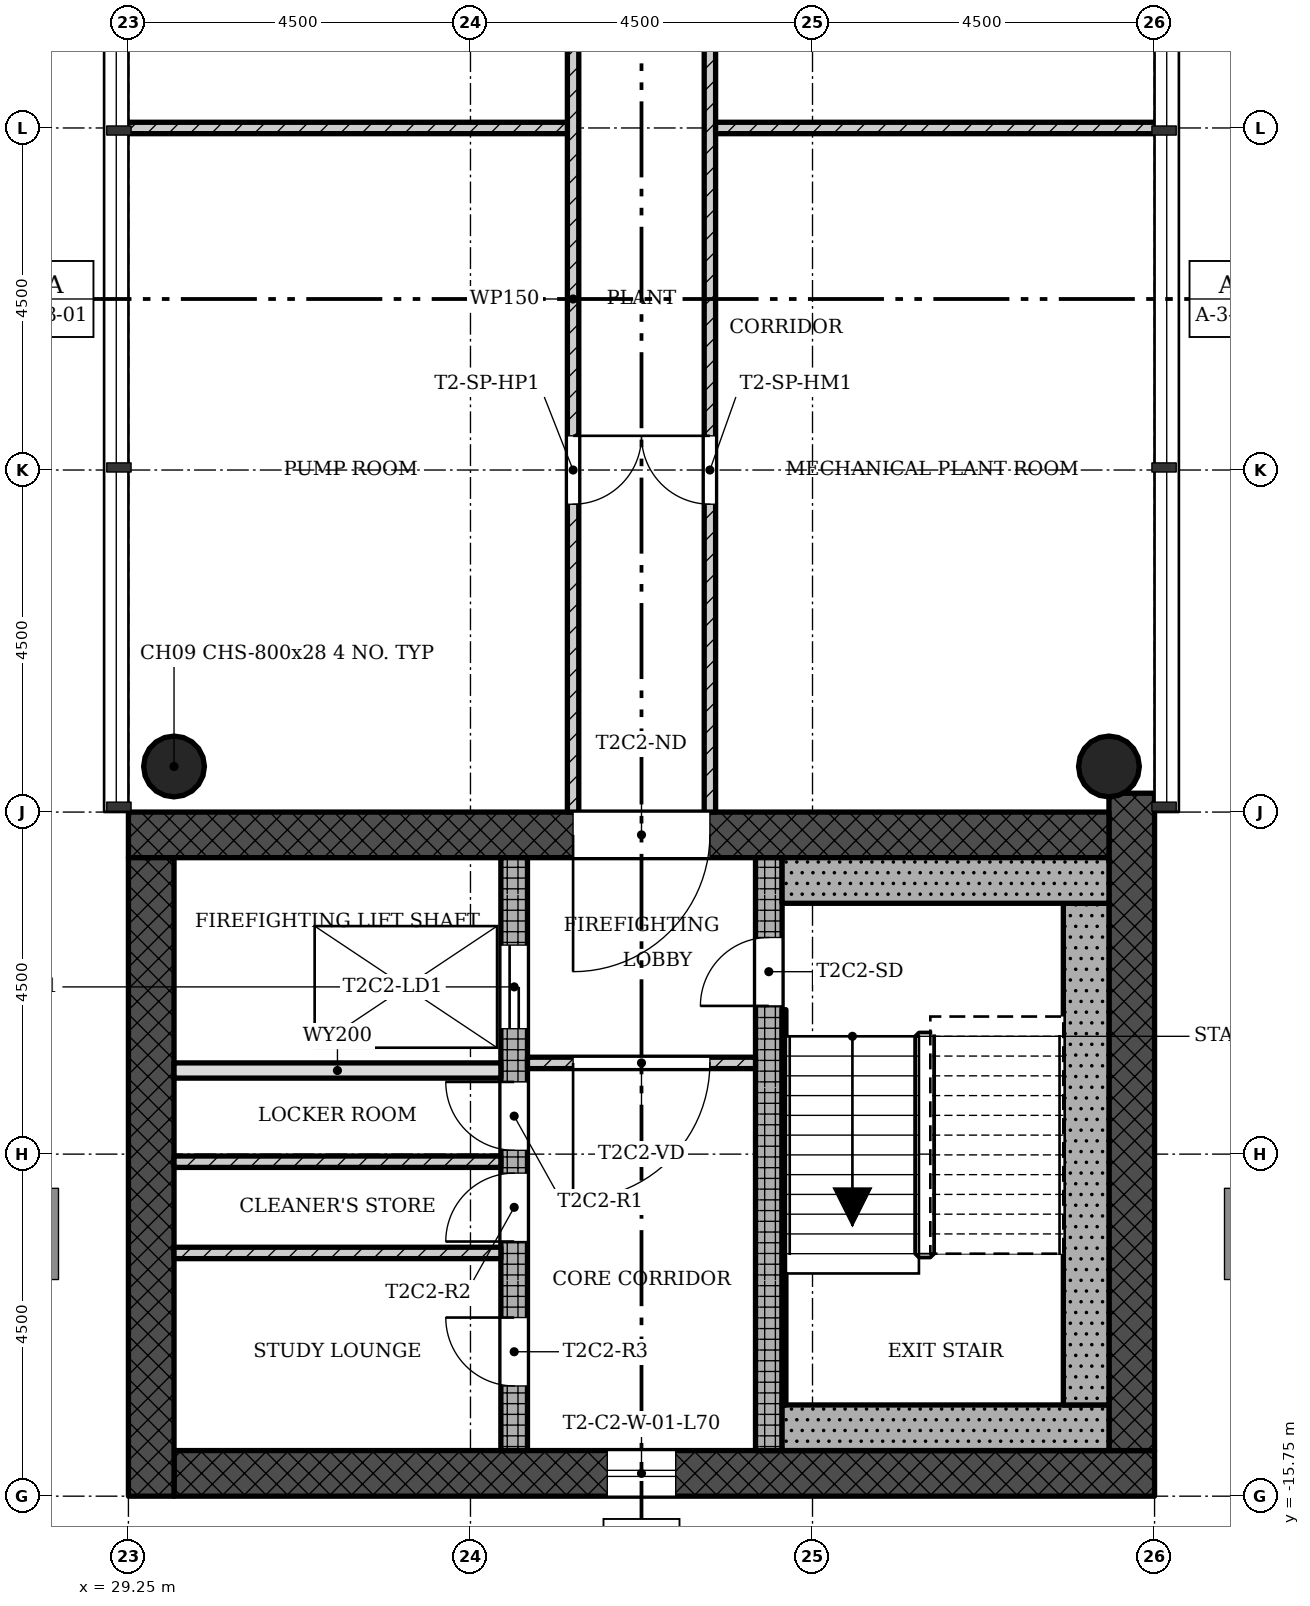
"""IFC4 building model, lengths in metres.
Left out: names, types, materials, properties, quantities, classifications, styles, units other than length and angle.
Written with IfcOpenShell. Run it as: python <this file> out.ifc"""

import sys

from ifc_helpers import new_model, si_unit, direction, frame, frame_2d, origin, origin_2d, place, context, subcontext, project, spatial, rectangle, hollow_circle, extrude, element, fill, save


model = new_model("IFC4")
c1 = context("Model", 3, precision=1e-05, world=origin(), true_north=direction((0.0, 1.0)))
c2 = subcontext(c1, "Body", "Model", "MODEL_VIEW")
j1 = project(units=[si_unit("LENGTHUNIT", "METRE"), si_unit("PLANEANGLEUNIT", "RADIAN")], contexts=[c1])
p1 = place(None, origin())
s1 = spatial("IfcSite", under=j1, at=p1, CompositionType="ELEMENT")
p2 = place(p1, origin())
s2 = spatial("IfcBuilding", under=s1, at=p2, CompositionType="ELEMENT")
p3 = place(p2, frame((0.0, 0.0, 255.9)))
s3 = spatial("IfcBuildingStorey", under=s2, at=p3, CompositionType="ELEMENT", Elevation=255.9)
p4 = place(p3, frame((29.85, -15.45, 0.0), z_axis=(0.0, 0.0, 1.0), x_axis=(1.0, 0.0, 0.0)))
e1 = element("IfcWall", 1, at=p4, inside=s3, PredefinedType="SHEAR", context=c2, shape_type="SweptSolid", body=[
    extrude(rectangle(XDim=12.9, YDim=0.6, at=frame_2d((6.45, 0.0))), origin(), (0.0, 0.0, 1.0), 4.5),
])
p5 = place(p4, frame((5.7, 0.0, 0.45)))
e2 = element("IfcOpeningElement", 2, at=p5, cuts=e1, PredefinedType="OPENING", context=c2, shape_type="SweptSolid", body=[
    extrude(rectangle(XDim=0.9, YDim=2.4, at=frame_2d((0.45, 1.2))), frame((0.0, 0.31, 0.0), z_axis=(0.0, -1.0, 0.0), x_axis=(1.0, 0.0, 0.0)), (0.0, 0.0, 1.0), 0.62),
])
p6 = place(p3, frame((42.45, -15.15, 0.0), z_axis=(0.0, 0.0, 1.0), x_axis=(0.0, 1.0, 0.0)))
e3 = element("IfcWall", 3, at=p6, inside=s3, PredefinedType="SHEAR", context=c2, shape_type="SweptSolid", body=[
    extrude(rectangle(XDim=8.648, YDim=0.6, at=frame_2d((4.324, 0.0))), origin(), (0.0, 0.0, 1.0), 4.5),
])
p7 = place(p3, frame((42.15, -7.05, 0.0), z_axis=(0.0, 0.0, 1.0), x_axis=(-1.0, 0.0, 0.0)))
e4 = element("IfcWall", 4, at=p7, inside=s3, PredefinedType="SHEAR", context=c2, shape_type="SweptSolid", body=[
    extrude(rectangle(XDim=12.9, YDim=0.6, at=frame_2d((6.45, 0.0))), origin(), (0.0, 0.0, 1.0), 4.5),
])
p8 = place(p7, frame((5.25, 0.0, 0.0)))
e5 = element("IfcOpeningElement", 5, at=p8, cuts=e4, PredefinedType="OPENING", context=c2, shape_type="SweptSolid", body=[
    extrude(rectangle(XDim=1.8, YDim=2.1, at=frame_2d((0.9, 1.05))), frame((0.0, 0.31, 0.0), z_axis=(0.0, -1.0, 0.0), x_axis=(1.0, 0.0, 0.0)), (0.0, 0.0, 1.0), 0.62),
])
p9 = place(p3, frame((29.55, -7.35, 0.0), z_axis=(0.0, 0.0, 1.0), x_axis=(0.0, -1.0, 0.0)))
e6 = element("IfcWall", 6, at=p9, inside=s3, PredefinedType="SHEAR", context=c2, shape_type="SweptSolid", body=[
    extrude(rectangle(XDim=8.4, YDim=0.6, at=frame_2d((4.2, 0.0))), origin(), (0.0, 0.0, 1.0), 4.5),
])
p10 = place(p3, frame((34.325, -15.15, 0.0), z_axis=(0.0, 0.0, 1.0), x_axis=(0.0, 1.0, 0.0)))
e7 = element("IfcWall", 7, at=p10, inside=s3, PredefinedType="SHEAR", context=c2, shape_type="SweptSolid", body=[
    extrude(rectangle(XDim=7.8, YDim=0.35, at=frame_2d((3.9, 0.0))), origin(), (0.0, 0.0, 1.0), 4.5),
])
p11 = place(p10, frame((5.55, 0.0, 0.0)))
e8 = element("IfcOpeningElement", 8, at=p11, cuts=e7, PredefinedType="OPENING", context=c2, shape_type="SweptSolid", body=[
    extrude(rectangle(XDim=1.1, YDim=2.1, at=frame_2d((0.55, 1.05))), frame((0.0, 0.185, 0.0), z_axis=(0.0, -1.0, 0.0), x_axis=(1.0, 0.0, 0.0)), (0.0, 0.0, 1.0), 0.37),
])
p12 = place(p10, frame((3.95, 0.0, 0.0)))
e9 = element("IfcOpeningElement", 9, at=p12, cuts=e7, PredefinedType="OPENING", context=c2, shape_type="SweptSolid", body=[
    extrude(rectangle(XDim=0.9, YDim=2.1, at=frame_2d((0.45, 1.05))), frame((0.0, 0.185, 0.0), z_axis=(0.0, -1.0, 0.0), x_axis=(1.0, 0.0, 0.0)), (0.0, 0.0, 1.0), 0.37),
])
p13 = place(p10, frame((2.75, 0.0, 0.0)))
e10 = element("IfcOpeningElement", 10, at=p13, cuts=e7, PredefinedType="OPENING", context=c2, shape_type="SweptSolid", body=[
    extrude(rectangle(XDim=0.9, YDim=2.1, at=frame_2d((0.45, 1.05))), frame((0.0, 0.185, 0.0), z_axis=(0.0, -1.0, 0.0), x_axis=(1.0, 0.0, 0.0)), (0.0, 0.0, 1.0), 0.37),
])
p14 = place(p10, frame((0.85, 0.0, 0.0)))
e11 = element("IfcOpeningElement", 11, at=p14, cuts=e7, PredefinedType="OPENING", context=c2, shape_type="SweptSolid", body=[
    extrude(rectangle(XDim=0.9, YDim=2.1, at=frame_2d((0.45, 1.05))), frame((0.0, 0.185, 0.0), z_axis=(0.0, -1.0, 0.0), x_axis=(1.0, 0.0, 0.0)), (0.0, 0.0, 1.0), 0.37),
])
p15 = place(p3, frame((37.675, -15.15, 0.0), z_axis=(0.0, 0.0, 1.0), x_axis=(0.0, 1.0, 0.0)))
e12 = element("IfcWall", 12, at=p15, inside=s3, PredefinedType="SHEAR", context=c2, shape_type="SweptSolid", body=[
    extrude(rectangle(XDim=7.8, YDim=0.35, at=frame_2d((3.9, 0.0))), origin(), (0.0, 0.0, 1.0), 4.5),
])
p16 = place(p15, frame((5.85, 0.0, 0.0)))
e13 = element("IfcOpeningElement", 13, at=p16, cuts=e12, PredefinedType="OPENING", context=c2, shape_type="SweptSolid", body=[
    extrude(rectangle(XDim=0.9, YDim=2.1, at=frame_2d((0.45, 1.05))), frame((0.0, 0.185, 0.0), z_axis=(0.0, -1.0, 0.0), x_axis=(1.0, 0.0, 0.0)), (0.0, 0.0, 1.0), 0.37),
])
for number, where, z_axis, x_axis in (
    (14, (42.15, -6.15, 0.0), (0.0, 0.0, 1.0), (1.0, 0.0, 0.0)),
    (15, (29.85, -6.15, 0.0), (0.0, 0.0, 1.0), (1.0, 0.0, 0.0)),
):
    element("IfcColumn", number, at=place(p3, frame(where, z_axis=z_axis, x_axis=x_axis)), inside=s3, PredefinedType="COLUMN", context=c2, shape_type="SweptSolid", body=[
        extrude(hollow_circle(Radius=0.4, WallThickness=0.028, at=origin_2d()), origin(), (0.0, 0.0, 1.0), 4.5),
    ])
p17 = place(p3, frame((34.5, -10.05, 0.0), z_axis=(0.0, 0.0, 1.0), x_axis=(1.0, 0.0, 0.0)))
e16 = element("IfcWall", 16, at=p17, inside=s3, PredefinedType="PARTITIONING", context=c2, shape_type="SweptSolid", body=[
    extrude(rectangle(XDim=3.0, YDim=0.15, at=frame_2d((1.5, 0.0))), origin(), (0.0, 0.0, 1.0), 4.1),
])
p18 = place(p17, frame((0.6, 0.0, 0.0)))
e17 = element("IfcOpeningElement", 17, at=p18, cuts=e16, PredefinedType="OPENING", context=c2, shape_type="SweptSolid", body=[
    extrude(rectangle(XDim=1.8, YDim=2.1, at=frame_2d((0.9, 1.05))), frame((0.0, 0.085, 0.0), z_axis=(0.0, -1.0, 0.0), x_axis=(1.0, 0.0, 0.0)), (0.0, 0.0, 1.0), 0.17),
])
p19 = place(p3, frame((29.85, -10.15, 0.0), z_axis=(0.0, 0.0, 1.0), x_axis=(1.0, 0.0, 0.0)))
e18 = element("IfcWall", 18, at=p19, inside=s3, PredefinedType="SOLIDWALL", context=c2, shape_type="SweptSolid", body=[
    extrude(rectangle(XDim=4.3, YDim=0.2, at=frame_2d((2.15, 0.0))), origin(), (0.0, 0.0, 1.0), 4.1),
])
for number, where, z_axis, x_axis in (
    (19, (29.85, -11.35, 0.0), (0.0, 0.0, 1.0), (1.0, 0.0, 0.0)),
    (20, (29.85, -12.55, 0.0), (0.0, 0.0, 1.0), (1.0, 0.0, 0.0)),
):
    element("IfcWall", number, at=place(p3, frame(where, z_axis=z_axis, x_axis=x_axis)), inside=s3, PredefinedType="PARTITIONING", context=c2, shape_type="SweptSolid", body=[
        extrude(rectangle(XDim=4.3, YDim=0.15, at=frame_2d((2.15, 0.0))), origin(), (0.0, 0.0, 1.0), 4.1),
    ])
p20 = place(p3, frame((35.1, -6.75, 0.0), z_axis=(0.0, 0.0, 1.0), x_axis=(0.0, 1.0, 0.0)))
e21 = element("IfcWall", 21, at=p20, inside=s3, PredefinedType="PARTITIONING", context=c2, shape_type="SweptSolid", body=[
    extrude(rectangle(XDim=13.5, YDim=0.15, at=frame_2d((6.75, 0.0))), origin(), (0.0, 0.0, 1.0), 4.1),
])
p21 = place(p20, frame((4.05, 0.0, 0.0)))
e22 = element("IfcOpeningElement", 22, at=p21, cuts=e21, PredefinedType="OPENING", context=c2, shape_type="SweptSolid", body=[
    extrude(rectangle(XDim=0.9, YDim=2.1, at=frame_2d((0.45, 1.05))), frame((0.0, 0.085, 0.0), z_axis=(0.0, -1.0, 0.0), x_axis=(1.0, 0.0, 0.0)), (0.0, 0.0, 1.0), 0.17),
])
p22 = place(p20, frame((10.8, 0.0, 0.0)))
e23 = element("IfcOpeningElement", 23, at=p22, cuts=e21, PredefinedType="OPENING", context=c2, shape_type="SweptSolid", body=[
    extrude(rectangle(XDim=0.9, YDim=2.1, at=frame_2d((0.45, 1.05))), frame((0.0, 0.085, 0.0), z_axis=(0.0, -1.0, 0.0), x_axis=(1.0, 0.0, 0.0)), (0.0, 0.0, 1.0), 0.17),
])
p23 = place(p3, frame((35.025, 2.25, 0.0), z_axis=(0.0, 0.0, 1.0), x_axis=(-1.0, 0.0, 0.0)))
e24 = element("IfcWall", 24, at=p23, inside=s3, PredefinedType="PARTITIONING", context=c2, shape_type="SweptSolid", body=[
    extrude(rectangle(XDim=5.875, YDim=0.15, at=frame_2d((2.938, 0.0))), origin(), (0.0, 0.0, 1.0), 4.1),
])
p24 = place(p3, frame((36.9, -6.75, 0.0), z_axis=(0.0, 0.0, 1.0), x_axis=(0.0, 1.0, 0.0)))
e25 = element("IfcWall", 25, at=p24, inside=s3, PredefinedType="PARTITIONING", context=c2, shape_type="SweptSolid", body=[
    extrude(rectangle(XDim=13.5, YDim=0.15, at=frame_2d((6.75, 0.0))), origin(), (0.0, 0.0, 1.0), 4.1),
])
p25 = place(p24, frame((4.05, 0.0, 0.0)))
e26 = element("IfcOpeningElement", 26, at=p25, cuts=e25, PredefinedType="OPENING", context=c2, shape_type="SweptSolid", body=[
    extrude(rectangle(XDim=0.9, YDim=2.1, at=frame_2d((0.45, 1.05))), frame((0.0, 0.085, 0.0), z_axis=(0.0, -1.0, 0.0), x_axis=(1.0, 0.0, 0.0)), (0.0, 0.0, 1.0), 0.17),
])
p26 = place(p24, frame((10.8, 0.0, 0.0)))
e27 = element("IfcOpeningElement", 27, at=p26, cuts=e25, PredefinedType="OPENING", context=c2, shape_type="SweptSolid", body=[
    extrude(rectangle(XDim=0.9, YDim=2.1, at=frame_2d((0.45, 1.05))), frame((0.0, 0.085, 0.0), z_axis=(0.0, -1.0, 0.0), x_axis=(1.0, 0.0, 0.0)), (0.0, 0.0, 1.0), 0.17),
])
p27 = place(p3, frame((36.975, 2.25, 0.0), z_axis=(0.0, 0.0, 1.0), x_axis=(1.0, 0.0, 0.0)))
e28 = element("IfcWall", 28, at=p27, inside=s3, PredefinedType="PARTITIONING", context=c2, shape_type="SweptSolid", body=[
    extrude(rectangle(XDim=5.875, YDim=0.15, at=frame_2d((2.938, 0.0))), origin(), (0.0, 0.0, 1.0), 4.1),
])
p28 = place(p3, frame((37.85, -14.85, 0.0), z_axis=(0.0, 0.0, 1.0), x_axis=(1.0, 0.0, 0.0)))
e29 = element("IfcWall", 29, at=p28, inside=s3, PredefinedType="SHEAR", context=c2, shape_type="SweptSolid", body=[
    extrude(rectangle(XDim=4.3, YDim=0.6, at=frame_2d((2.15, 0.0))), origin(), (0.0, 0.0, 1.0), 4.5),
])
p29 = place(p3, frame((41.85, -7.95, 0.0), z_axis=(0.0, 0.0, 1.0), x_axis=(0.0, -1.0, 0.0)))
e30 = element("IfcWall", 30, at=p29, inside=s3, PredefinedType="SHEAR", context=c2, shape_type="SweptSolid", body=[
    extrude(rectangle(XDim=6.6, YDim=0.6, at=frame_2d((3.3, 0.0))), origin(), (0.0, 0.0, 1.0), 4.5),
])
p30 = place(p3, frame((37.85, -7.65, 0.0), z_axis=(0.0, 0.0, 1.0), x_axis=(1.0, 0.0, 0.0)))
e31 = element("IfcWall", 31, at=p30, inside=s3, PredefinedType="SHEAR", context=c2, shape_type="SweptSolid", body=[
    extrude(rectangle(XDim=4.3, YDim=0.6, at=frame_2d((2.15, 0.0))), origin(), (0.0, 0.0, 1.0), 4.5),
])
p31 = place(p3, frame((37.875, -9.35, 0.0), z_axis=(0.0, 0.0, 1.0), x_axis=(0.0, -1.0, 0.0)))
e32 = element("IfcWall", 32, at=p31, inside=s3, PredefinedType="SHEAR", context=c2, shape_type="SweptSolid", body=[
    extrude(rectangle(XDim=5.2, YDim=0.05, at=frame_2d((2.6, 0.0))), origin(), (0.0, 0.0, 1.0), 4.5),
])
p32 = place(p5, origin())
e33 = element("IfcWindow", 33, at=p32, inside=s3, PartitioningType="SINGLE_PANEL", PredefinedType="WINDOW", context=c2, shape_type="SweptSolid", body=[
    extrude(rectangle(XDim=0.9, YDim=2.4, at=frame_2d((0.45, 1.2))), frame((0.0, 0.03, 0.0), z_axis=(0.0, -1.0, 0.0), x_axis=(1.0, 0.0, 0.0)), (0.0, 0.0, 1.0), 0.06),
])
fill(e2, e33)
p33 = place(p18, origin())
e34 = element("IfcDoor", 34, at=p33, inside=s3, OperationType="SINGLE_SWING_LEFT", PredefinedType="DOOR", context=c2, shape_type="SweptSolid", body=[
    extrude(rectangle(XDim=1.8, YDim=2.1, at=frame_2d((0.9, 1.05))), frame((0.0, 0.025, 0.0), z_axis=(0.0, -1.0, 0.0), x_axis=(1.0, 0.0, 0.0)), (0.0, 0.0, 1.0), 0.05),
])
fill(e17, e34)
p34 = place(p21, origin())
e35 = element("IfcDoor", 35, at=p34, inside=s3, OperationType="SINGLE_SWING_RIGHT", PredefinedType="DOOR", context=c2, shape_type="SweptSolid", body=[
    extrude(rectangle(XDim=0.9, YDim=2.1, at=frame_2d((0.45, 1.05))), frame((0.0, 0.025, 0.0), z_axis=(0.0, -1.0, 0.0), x_axis=(1.0, 0.0, 0.0)), (0.0, 0.0, 1.0), 0.05),
])
fill(e22, e35)
p35 = place(p25, origin())
e36 = element("IfcDoor", 36, at=p35, inside=s3, OperationType="SINGLE_SWING_LEFT", PredefinedType="DOOR", context=c2, shape_type="SweptSolid", body=[
    extrude(rectangle(XDim=0.9, YDim=2.1, at=frame_2d((0.45, 1.05))), frame((0.0, 0.025, 0.0), z_axis=(0.0, -1.0, 0.0), x_axis=(1.0, 0.0, 0.0)), (0.0, 0.0, 1.0), 0.05),
])
fill(e26, e36)
p36 = place(p16, origin())
e37 = element("IfcDoor", 37, at=p36, inside=s3, OperationType="SINGLE_SWING_RIGHT", PredefinedType="DOOR", context=c2, shape_type="SweptSolid", body=[
    extrude(rectangle(XDim=0.9, YDim=2.1, at=frame_2d((0.45, 1.05))), frame((0.0, 0.025, 0.0), z_axis=(0.0, -1.0, 0.0), x_axis=(1.0, 0.0, 0.0)), (0.0, 0.0, 1.0), 0.05),
])
fill(e13, e37)
p37 = place(p11, origin())
e38 = element("IfcDoor", 38, at=p37, inside=s3, OperationType="SLIDING_TO_LEFT", PredefinedType="DOOR", context=c2, shape_type="SweptSolid", body=[
    extrude(rectangle(XDim=1.1, YDim=2.1, at=frame_2d((0.55, 1.05))), frame((0.0, 0.025, 0.0), z_axis=(0.0, -1.0, 0.0), x_axis=(1.0, 0.0, 0.0)), (0.0, 0.0, 1.0), 0.05),
])
fill(e8, e38)
p38 = place(p12, origin())
e39 = element("IfcDoor", 39, at=p38, inside=s3, OperationType="SINGLE_SWING_LEFT", PredefinedType="DOOR", context=c2, shape_type="SweptSolid", body=[
    extrude(rectangle(XDim=0.9, YDim=2.1, at=frame_2d((0.45, 1.05))), frame((0.0, 0.025, 0.0), z_axis=(0.0, -1.0, 0.0), x_axis=(1.0, 0.0, 0.0)), (0.0, 0.0, 1.0), 0.05),
])
fill(e9, e39)
p39 = place(p13, origin())
e40 = element("IfcDoor", 40, at=p39, inside=s3, OperationType="SINGLE_SWING_RIGHT", PredefinedType="DOOR", context=c2, shape_type="SweptSolid", body=[
    extrude(rectangle(XDim=0.9, YDim=2.1, at=frame_2d((0.45, 1.05))), frame((0.0, 0.025, 0.0), z_axis=(0.0, -1.0, 0.0), x_axis=(1.0, 0.0, 0.0)), (0.0, 0.0, 1.0), 0.05),
])
fill(e10, e40)
p40 = place(p14, origin())
e41 = element("IfcDoor", 41, at=p40, inside=s3, OperationType="SINGLE_SWING_LEFT", PredefinedType="DOOR", context=c2, shape_type="SweptSolid", body=[
    extrude(rectangle(XDim=0.9, YDim=2.1, at=frame_2d((0.45, 1.05))), frame((0.0, 0.025, 0.0), z_axis=(0.0, -1.0, 0.0), x_axis=(1.0, 0.0, 0.0)), (0.0, 0.0, 1.0), 0.05),
])
fill(e11, e41)
p41 = place(p8, origin())
e42 = element("IfcDoor", 42, at=p41, inside=s3, OperationType="SINGLE_SWING_LEFT", PredefinedType="DOOR", context=c2, shape_type="SweptSolid", body=[
    extrude(rectangle(XDim=1.8, YDim=2.1, at=frame_2d((0.9, 1.05))), frame((0.0, 0.025, 0.0), z_axis=(0.0, -1.0, 0.0), x_axis=(1.0, 0.0, 0.0)), (0.0, 0.0, 1.0), 0.05),
])
fill(e5, e42)
save(model, sys.argv[1])
